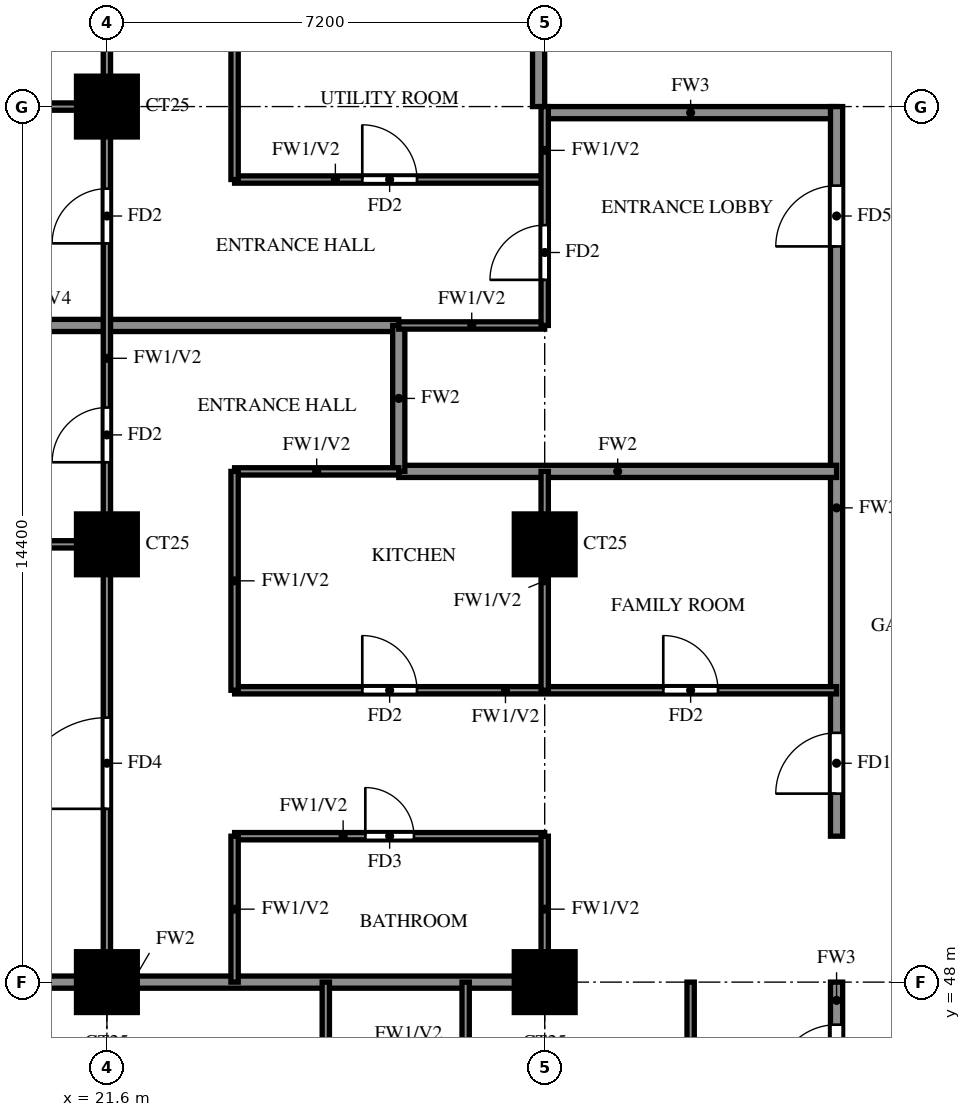
"""IFC4 building model, lengths in metres.
Left out: names, types, materials, properties, quantities, classifications, styles, units other than length and angle.
Written with IfcOpenShell. Run it as: python <this file> out.ifc"""

import sys

from ifc_helpers import new_model, si_unit, direction, frame, frame_2d, origin, origin_2d, place, context, subcontext, project, spatial, rectangle, extrude, source, transform, mapped, element, fill, save


model = new_model("IFC4")
c1 = context("Model", 3, precision=1e-05, world=origin(), true_north=direction((0.0, 1.0)))
c2 = subcontext(c1, "Body", "Model", "MODEL_VIEW")
j1 = project(units=[si_unit("LENGTHUNIT", "METRE"), si_unit("PLANEANGLEUNIT", "RADIAN")], contexts=[c1])
p1 = place(None, origin())
s1 = spatial("IfcSite", under=j1, at=p1, CompositionType="ELEMENT")
p2 = place(p1, origin())
s2 = spatial("IfcBuilding", under=s1, at=p2, CompositionType="ELEMENT")
p3 = place(p2, frame((0.0, 0.0, 157.0)))
s3 = spatial("IfcBuildingStorey", under=s2, at=p3, CompositionType="ELEMENT", Elevation=157.0)
m1 = source(origin(), c2, "Body", "SweptSolid", [
    extrude(rectangle(XDim=1.0, YDim=1.0, at=origin_2d()), origin(), (0.0, 0.0, 1.0), 3.2),
])
for number, where, z_axis, x_axis in (
    (1, (21.6, 48.0, 0.0), (0.0, 0.0, 1.0), (1.0, 0.0, 0.0)),
    (2, (28.8, 48.0, 0.0), (0.0, 0.0, 1.0), (1.0, 0.0, 0.0)),
    (3, (21.6, 55.2, 0.0), (0.0, 0.0, 1.0), (1.0, 0.0, 0.0)),
    (4, (28.8, 55.2, 0.0), (0.0, 0.0, 1.0), (1.0, 0.0, 0.0)),
    (5, (21.6, 62.4, 0.0), (0.0, 0.0, 1.0), (1.0, 0.0, 0.0)),
):
    element("IfcColumn", number, at=place(p3, frame(where, z_axis=z_axis, x_axis=x_axis)), inside=s3, PredefinedType="COLUMN", context=c2, shape_type="MappedRepresentation", body=[
        mapped(m1, transform((0.0, 0.0, 0.0))),
    ])
p4 = place(p3, frame((28.8, 62.3, 0.0), z_axis=(0.0, 0.0, 1.0), x_axis=(1.0, 0.0, 0.0)))
e6 = element("IfcWall", 6, at=p4, inside=s3, PredefinedType="SOLIDWALL", context=c2, shape_type="SweptSolid", body=[
    extrude(rectangle(XDim=4.8, YDim=0.2, at=frame_2d((2.4, 0.0))), origin(), (0.0, 0.0, 1.0), 3.2),
])
p5 = place(p3, frame((28.7, 62.4, 0.0), z_axis=(0.0, 0.0, 1.0), x_axis=(0.0, 1.0, 0.0)))
e7 = element("IfcWall", 7, at=p5, inside=s3, PredefinedType="SOLIDWALL", context=c2, shape_type="SweptSolid", body=[
    extrude(rectangle(XDim=15.6, YDim=0.2, at=frame_2d((7.8, 0.0))), origin(), (0.0, 0.0, 1.0), 3.2),
])
p6 = place(p3, frame((33.6, 45.6, 0.0), z_axis=(0.0, 0.0, 1.0), x_axis=(0.0, 1.0, 0.0)))
e8 = element("IfcWall", 8, at=p6, inside=s3, PredefinedType="SOLIDWALL", context=c2, shape_type="SweptSolid", body=[
    extrude(rectangle(XDim=2.4, YDim=0.2, at=frame_2d((1.2, 0.0))), origin(), (0.0, 0.0, 1.0), 3.2),
])
p7 = place(p6, frame((0.7, 0.0, 0.0)))
e9 = element("IfcOpeningElement", 9, at=p7, cuts=e8, PredefinedType="OPENING", context=c2, shape_type="SweptSolid", body=[
    extrude(rectangle(XDim=1.0, YDim=2.1, at=frame_2d((0.5, 1.05))), frame((0.0, 0.11, 0.0), z_axis=(0.0, -1.0, 0.0), x_axis=(1.0, 0.0, 0.0)), (0.0, 0.0, 1.0), 0.22),
])
p8 = place(p3, frame((33.6, 50.4, 0.0), z_axis=(0.0, 0.0, 1.0), x_axis=(0.0, 1.0, 0.0)))
e10 = element("IfcWall", 10, at=p8, inside=s3, PredefinedType="SOLIDWALL", context=c2, shape_type="SweptSolid", body=[
    extrude(rectangle(XDim=12.0, YDim=0.2, at=frame_2d((6.0, 0.0))), origin(), (0.0, 0.0, 1.0), 3.2),
])
p9 = place(p8, frame((0.7, 0.0, 0.0)))
e11 = element("IfcOpeningElement", 11, at=p9, cuts=e10, PredefinedType="OPENING", context=c2, shape_type="SweptSolid", body=[
    extrude(rectangle(XDim=1.0, YDim=2.1, at=frame_2d((0.5, 1.05))), frame((0.0, 0.11, 0.0), z_axis=(0.0, -1.0, 0.0), x_axis=(1.0, 0.0, 0.0)), (0.0, 0.0, 1.0), 0.22),
])
p10 = place(p8, frame((9.7, 0.0, 0.0)))
e12 = element("IfcOpeningElement", 12, at=p10, cuts=e10, PredefinedType="OPENING", context=c2, shape_type="SweptSolid", body=[
    extrude(rectangle(XDim=1.0, YDim=2.1, at=frame_2d((0.5, 1.05))), frame((0.0, 0.11, 0.0), z_axis=(0.0, -1.0, 0.0), x_axis=(1.0, 0.0, 0.0)), (0.0, 0.0, 1.0), 0.22),
])
p11 = place(p3, frame((14.525, 48.0, 0.0), z_axis=(0.0, 0.0, 1.0), x_axis=(1.0, 0.0, 0.0)))
e13 = element("IfcWall", 13, at=p11, inside=s3, PredefinedType="SOLIDWALL", context=c2, shape_type="SweptSolid", body=[
    extrude(rectangle(XDim=14.275, YDim=0.2, at=frame_2d((7.138, 0.0))), origin(), (0.0, 0.0, 1.0), 3.2),
])
p12 = place(p3, frame((26.4, 56.4, 0.0), z_axis=(0.0, 0.0, 1.0), x_axis=(1.0, 0.0, 0.0)))
e14 = element("IfcWall", 14, at=p12, inside=s3, PredefinedType="SOLIDWALL", context=c2, shape_type="SweptSolid", body=[
    extrude(rectangle(XDim=7.2, YDim=0.2, at=frame_2d((3.6, 0.0))), origin(), (0.0, 0.0, 1.0), 3.2),
])
p13 = place(p3, frame((14.525, 58.8, 0.0), z_axis=(0.0, 0.0, 1.0), x_axis=(1.0, 0.0, 0.0)))
e15 = element("IfcWall", 15, at=p13, inside=s3, PredefinedType="SOLIDWALL", context=c2, shape_type="SweptSolid", body=[
    extrude(rectangle(XDim=11.875, YDim=0.2, at=frame_2d((5.938, 0.0))), origin(), (0.0, 0.0, 1.0), 2.3),
])
p14 = place(p3, frame((26.4, 56.4, 0.0), z_axis=(0.0, 0.0, 1.0), x_axis=(0.0, 1.0, 0.0)))
e16 = element("IfcWall", 16, at=p14, inside=s3, PredefinedType="SOLIDWALL", context=c2, shape_type="SweptSolid", body=[
    extrude(rectangle(XDim=2.4, YDim=0.2, at=frame_2d((1.2, 0.0))), origin(), (0.0, 0.0, 1.0), 3.2),
])
p15 = place(p3, frame((23.7, 50.4, 0.0), z_axis=(0.0, 0.0, 1.0), x_axis=(1.0, 0.0, 0.0)))
e17 = element("IfcWall", 17, at=p15, inside=s3, PredefinedType="PARTITIONING", context=c2, shape_type="SweptSolid", body=[
    extrude(rectangle(XDim=5.1, YDim=0.12, at=frame_2d((2.55, 0.0))), origin(), (0.0, 0.0, 1.0), 3.2),
])
p16 = place(p15, frame((2.15, 0.0, 0.0)))
e18 = element("IfcOpeningElement", 18, at=p16, cuts=e17, PredefinedType="OPENING", context=c2, shape_type="SweptSolid", body=[
    extrude(rectangle(XDim=0.8, YDim=2.1, at=frame_2d((0.4, 1.05))), frame((0.0, 0.07, 0.0), z_axis=(0.0, -1.0, 0.0), x_axis=(1.0, 0.0, 0.0)), (0.0, 0.0, 1.0), 0.14),
])
p17 = place(p3, frame((23.7, 52.8, 0.0), z_axis=(0.0, 0.0, 1.0), x_axis=(1.0, 0.0, 0.0)))
e19 = element("IfcWall", 19, at=p17, inside=s3, PredefinedType="PARTITIONING", context=c2, shape_type="SweptSolid", body=[
    extrude(rectangle(XDim=9.9, YDim=0.12, at=frame_2d((4.95, 0.0))), origin(), (0.0, 0.0, 1.0), 3.2),
])
p18 = place(p17, frame((2.1, 0.0, 0.0)))
e20 = element("IfcOpeningElement", 20, at=p18, cuts=e19, PredefinedType="OPENING", context=c2, shape_type="SweptSolid", body=[
    extrude(rectangle(XDim=0.9, YDim=2.1, at=frame_2d((0.45, 1.05))), frame((0.0, 0.07, 0.0), z_axis=(0.0, -1.0, 0.0), x_axis=(1.0, 0.0, 0.0)), (0.0, 0.0, 1.0), 0.14),
])
p19 = place(p17, frame((7.05, 0.0, 0.0)))
e21 = element("IfcOpeningElement", 21, at=p19, cuts=e19, PredefinedType="OPENING", context=c2, shape_type="SweptSolid", body=[
    extrude(rectangle(XDim=0.9, YDim=2.1, at=frame_2d((0.45, 1.05))), frame((0.0, 0.07, 0.0), z_axis=(0.0, -1.0, 0.0), x_axis=(1.0, 0.0, 0.0)), (0.0, 0.0, 1.0), 0.14),
])
p20 = place(p3, frame((14.525, 55.2, 0.0), z_axis=(0.0, 0.0, 1.0), x_axis=(1.0, 0.0, 0.0)))
e22 = element("IfcWall", 22, at=p20, inside=s3, PredefinedType="PARTITIONING", context=c2, shape_type="SweptSolid", body=[
    extrude(rectangle(XDim=7.075, YDim=0.12, at=frame_2d((3.538, 0.0))), origin(), (0.0, 0.0, 1.0), 3.2),
])
p21 = place(p3, frame((23.7, 56.4, 0.0), z_axis=(0.0, 0.0, 1.0), x_axis=(1.0, 0.0, 0.0)))
e23 = element("IfcWall", 23, at=p21, inside=s3, PredefinedType="PARTITIONING", context=c2, shape_type="SweptSolid", body=[
    extrude(rectangle(XDim=2.7, YDim=0.12, at=frame_2d((1.35, 0.0))), origin(), (0.0, 0.0, 1.0), 3.2),
])
p22 = place(p3, frame((26.4, 58.8, 0.0), z_axis=(0.0, 0.0, 1.0), x_axis=(1.0, 0.0, 0.0)))
e24 = element("IfcWall", 24, at=p22, inside=s3, PredefinedType="PARTITIONING", context=c2, shape_type="SweptSolid", body=[
    extrude(rectangle(XDim=2.4, YDim=0.12, at=frame_2d((1.2, 0.0))), origin(), (0.0, 0.0, 1.0), 3.2),
])
p23 = place(p3, frame((23.7, 61.2, 0.0), z_axis=(0.0, 0.0, 1.0), x_axis=(1.0, 0.0, 0.0)))
e25 = element("IfcWall", 25, at=p23, inside=s3, PredefinedType="PARTITIONING", context=c2, shape_type="SweptSolid", body=[
    extrude(rectangle(XDim=5.1, YDim=0.12, at=frame_2d((2.55, 0.0))), origin(), (0.0, 0.0, 1.0), 3.2),
])
p24 = place(p23, frame((2.1, 0.0, 0.0)))
e26 = element("IfcOpeningElement", 26, at=p24, cuts=e25, PredefinedType="OPENING", context=c2, shape_type="SweptSolid", body=[
    extrude(rectangle(XDim=0.9, YDim=2.1, at=frame_2d((0.45, 1.05))), frame((0.0, 0.07, 0.0), z_axis=(0.0, -1.0, 0.0), x_axis=(1.0, 0.0, 0.0)), (0.0, 0.0, 1.0), 0.14),
])
p25 = place(p3, frame((14.525, 62.4, 0.0), z_axis=(0.0, 0.0, 1.0), x_axis=(1.0, 0.0, 0.0)))
e27 = element("IfcWall", 27, at=p25, inside=s3, PredefinedType="PARTITIONING", context=c2, shape_type="SweptSolid", body=[
    extrude(rectangle(XDim=7.075, YDim=0.12, at=frame_2d((3.538, 0.0))), origin(), (0.0, 0.0, 1.0), 3.2),
])
p26 = place(p3, frame((21.6, 48.0, 0.0), z_axis=(0.0, 0.0, 1.0), x_axis=(0.0, 1.0, 0.0)))
e28 = element("IfcWall", 28, at=p26, inside=s3, PredefinedType="PARTITIONING", context=c2, shape_type="SweptSolid", body=[
    extrude(rectangle(XDim=21.6, YDim=0.12, at=frame_2d((10.8, 0.0))), origin(), (0.0, 0.0, 1.0), 3.2),
])
p27 = place(p26, frame((2.85, 0.0, 0.0)))
e29 = element("IfcOpeningElement", 29, at=p27, cuts=e28, PredefinedType="OPENING", context=c2, shape_type="SweptSolid", body=[
    extrude(rectangle(XDim=1.5, YDim=2.1, at=frame_2d((0.75, 1.05))), frame((0.0, 0.07, 0.0), z_axis=(0.0, -1.0, 0.0), x_axis=(1.0, 0.0, 0.0)), (0.0, 0.0, 1.0), 0.14),
])
p28 = place(p26, frame((8.55, 0.0, 0.0)))
e30 = element("IfcOpeningElement", 30, at=p28, cuts=e28, PredefinedType="OPENING", context=c2, shape_type="SweptSolid", body=[
    extrude(rectangle(XDim=0.9, YDim=2.1, at=frame_2d((0.45, 1.05))), frame((0.0, 0.07, 0.0), z_axis=(0.0, -1.0, 0.0), x_axis=(1.0, 0.0, 0.0)), (0.0, 0.0, 1.0), 0.14),
])
p29 = place(p26, frame((12.15, 0.0, 0.0)))
e31 = element("IfcOpeningElement", 31, at=p29, cuts=e28, PredefinedType="OPENING", context=c2, shape_type="SweptSolid", body=[
    extrude(rectangle(XDim=0.9, YDim=2.1, at=frame_2d((0.45, 1.05))), frame((0.0, 0.07, 0.0), z_axis=(0.0, -1.0, 0.0), x_axis=(1.0, 0.0, 0.0)), (0.0, 0.0, 1.0), 0.14),
])
p30 = place(p26, frame((17.55, 0.0, 0.0)))
e32 = element("IfcOpeningElement", 32, at=p30, cuts=e28, PredefinedType="OPENING", context=c2, shape_type="SweptSolid", body=[
    extrude(rectangle(XDim=0.9, YDim=2.1, at=frame_2d((0.45, 1.05))), frame((0.0, 0.07, 0.0), z_axis=(0.0, -1.0, 0.0), x_axis=(1.0, 0.0, 0.0)), (0.0, 0.0, 1.0), 0.14),
])
p31 = place(p3, frame((23.7, 48.0, 0.0), z_axis=(0.0, 0.0, 1.0), x_axis=(0.0, 1.0, 0.0)))
e33 = element("IfcWall", 33, at=p31, inside=s3, PredefinedType="PARTITIONING", context=c2, shape_type="SweptSolid", body=[
    extrude(rectangle(XDim=2.4, YDim=0.12, at=frame_2d((1.2, 0.0))), origin(), (0.0, 0.0, 1.0), 3.2),
])
p32 = place(p3, frame((23.7, 52.8, 0.0), z_axis=(0.0, 0.0, 1.0), x_axis=(0.0, 1.0, 0.0)))
e34 = element("IfcWall", 34, at=p32, inside=s3, PredefinedType="PARTITIONING", context=c2, shape_type="SweptSolid", body=[
    extrude(rectangle(XDim=3.6, YDim=0.12, at=frame_2d((1.8, 0.0))), origin(), (0.0, 0.0, 1.0), 3.2),
])
p33 = place(p3, frame((23.7, 61.2, 0.0), z_axis=(0.0, 0.0, 1.0), x_axis=(0.0, 1.0, 0.0)))
e35 = element("IfcWall", 35, at=p33, inside=s3, PredefinedType="PARTITIONING", context=c2, shape_type="SweptSolid", body=[
    extrude(rectangle(XDim=12.0, YDim=0.12, at=frame_2d((6.0, 0.0))), origin(), (0.0, 0.0, 1.0), 3.2),
])
p34 = place(p33, frame((4.2, 0.0, 0.0)))
e36 = element("IfcOpeningElement", 36, at=p34, cuts=e35, PredefinedType="OPENING", context=c2, shape_type="SweptSolid", body=[
    extrude(rectangle(XDim=0.9, YDim=2.1, at=frame_2d((0.45, 1.05))), frame((0.0, 0.07, 0.0), z_axis=(0.0, -1.0, 0.0), x_axis=(1.0, 0.0, 0.0)), (0.0, 0.0, 1.0), 0.14),
])
p35 = place(p33, frame((7.975, 0.0, 0.0)))
e37 = element("IfcOpeningElement", 37, at=p35, cuts=e35, PredefinedType="OPENING", context=c2, shape_type="SweptSolid", body=[
    extrude(rectangle(XDim=0.8, YDim=2.1, at=frame_2d((0.4, 1.05))), frame((0.0, 0.07, 0.0), z_axis=(0.0, -1.0, 0.0), x_axis=(1.0, 0.0, 0.0)), (0.0, 0.0, 1.0), 0.14),
])
p36 = place(p33, frame((10.45, 0.0, 0.0)))
e38 = element("IfcOpeningElement", 38, at=p36, cuts=e35, PredefinedType="OPENING", context=c2, shape_type="SweptSolid", body=[
    extrude(rectangle(XDim=0.8, YDim=2.1, at=frame_2d((0.4, 1.05))), frame((0.0, 0.07, 0.0), z_axis=(0.0, -1.0, 0.0), x_axis=(1.0, 0.0, 0.0)), (0.0, 0.0, 1.0), 0.14),
])
p37 = place(p3, frame((25.2, 39.725, 0.0), z_axis=(0.0, 0.0, 1.0), x_axis=(0.0, 1.0, 0.0)))
e39 = element("IfcWall", 39, at=p37, inside=s3, PredefinedType="PARTITIONING", context=c2, shape_type="SweptSolid", body=[
    extrude(rectangle(XDim=8.275, YDim=0.12, at=frame_2d((4.137, 0.0))), origin(), (0.0, 0.0, 1.0), 3.2),
])
p38 = place(p37, frame((4.525, 0.0, 0.0)))
e40 = element("IfcOpeningElement", 40, at=p38, cuts=e39, PredefinedType="OPENING", context=c2, shape_type="SweptSolid", body=[
    extrude(rectangle(XDim=0.9, YDim=2.1, at=frame_2d((0.45, 1.05))), frame((0.0, 0.07, 0.0), z_axis=(0.0, -1.0, 0.0), x_axis=(1.0, 0.0, 0.0)), (0.0, 0.0, 1.0), 0.14),
])
for number, where, z_axis, x_axis in (
    (41, (27.5, 45.6, 0.0), (0.0, 0.0, 1.0), (0.0, 1.0, 0.0)),
    (42, (28.8, 48.0, 0.0), (0.0, 0.0, 1.0), (0.0, 1.0, 0.0)),
):
    element("IfcWall", number, at=place(p3, frame(where, z_axis=z_axis, x_axis=x_axis)), inside=s3, PredefinedType="PARTITIONING", context=c2, shape_type="SweptSolid", body=[
        extrude(rectangle(XDim=2.4, YDim=0.12, at=frame_2d((1.2, 0.0))), origin(), (0.0, 0.0, 1.0), 3.2),
    ])
p39 = place(p3, frame((28.8, 52.8, 0.0), z_axis=(0.0, 0.0, 1.0), x_axis=(0.0, 1.0, 0.0)))
e43 = element("IfcWall", 43, at=p39, inside=s3, PredefinedType="PARTITIONING", context=c2, shape_type="SweptSolid", body=[
    extrude(rectangle(XDim=3.6, YDim=0.12, at=frame_2d((1.8, 0.0))), origin(), (0.0, 0.0, 1.0), 3.2),
])
p40 = place(p3, frame((28.8, 58.8, 0.0), z_axis=(0.0, 0.0, 1.0), x_axis=(0.0, 1.0, 0.0)))
e44 = element("IfcWall", 44, at=p40, inside=s3, PredefinedType="PARTITIONING", context=c2, shape_type="SweptSolid", body=[
    extrude(rectangle(XDim=3.6, YDim=0.12, at=frame_2d((1.8, 0.0))), origin(), (0.0, 0.0, 1.0), 3.2),
])
p41 = place(p40, frame((0.75, 0.0, 0.0)))
e45 = element("IfcOpeningElement", 45, at=p41, cuts=e44, PredefinedType="OPENING", context=c2, shape_type="SweptSolid", body=[
    extrude(rectangle(XDim=0.9, YDim=2.1, at=frame_2d((0.45, 1.05))), frame((0.0, 0.07, 0.0), z_axis=(0.0, -1.0, 0.0), x_axis=(1.0, 0.0, 0.0)), (0.0, 0.0, 1.0), 0.14),
])
p42 = place(p3, frame((31.2, 45.6, 0.0), z_axis=(0.0, 0.0, 1.0), x_axis=(0.0, 1.0, 0.0)))
e46 = element("IfcWall", 46, at=p42, inside=s3, PredefinedType="PARTITIONING", context=c2, shape_type="SweptSolid", body=[
    extrude(rectangle(XDim=2.4, YDim=0.12, at=frame_2d((1.2, 0.0))), origin(), (0.0, 0.0, 1.0), 3.2),
])
p43 = place(p7, origin())
e47 = element("IfcDoor", 47, at=p43, inside=s3, OperationType="SINGLE_SWING_LEFT", PredefinedType="DOOR", context=c2, shape_type="SweptSolid", body=[
    extrude(rectangle(XDim=1.0, YDim=2.1, at=frame_2d((0.5, 1.05))), frame((0.0, 0.025, 0.0), z_axis=(0.0, -1.0, 0.0), x_axis=(1.0, 0.0, 0.0)), (0.0, 0.0, 1.0), 0.05),
])
fill(e9, e47)
p44 = place(p9, origin())
e48 = element("IfcDoor", 48, at=p44, inside=s3, OperationType="SINGLE_SWING_RIGHT", PredefinedType="DOOR", context=c2, shape_type="SweptSolid", body=[
    extrude(rectangle(XDim=1.0, YDim=2.1, at=frame_2d((0.5, 1.05))), frame((0.0, 0.025, 0.0), z_axis=(0.0, -1.0, 0.0), x_axis=(1.0, 0.0, 0.0)), (0.0, 0.0, 1.0), 0.05),
])
fill(e11, e48)
p45 = place(p27, origin())
e49 = element("IfcDoor", 49, at=p45, inside=s3, OperationType="SINGLE_SWING_LEFT", PredefinedType="DOOR", context=c2, shape_type="SweptSolid", body=[
    extrude(rectangle(XDim=1.5, YDim=2.1, at=frame_2d((0.75, 1.05))), frame((0.0, 0.025, 0.0), z_axis=(0.0, -1.0, 0.0), x_axis=(1.0, 0.0, 0.0)), (0.0, 0.0, 1.0), 0.05),
])
fill(e29, e49)
p46 = place(p28, origin())
e50 = element("IfcDoor", 50, at=p46, inside=s3, OperationType="SINGLE_SWING_LEFT", PredefinedType="DOOR", context=c2, shape_type="SweptSolid", body=[
    extrude(rectangle(XDim=0.9, YDim=2.1, at=frame_2d((0.45, 1.05))), frame((0.0, 0.025, 0.0), z_axis=(0.0, -1.0, 0.0), x_axis=(1.0, 0.0, 0.0)), (0.0, 0.0, 1.0), 0.05),
])
fill(e30, e50)
p47 = place(p16, origin())
e51 = element("IfcDoor", 51, at=p47, inside=s3, OperationType="SINGLE_SWING_RIGHT", PredefinedType="DOOR", context=c2, shape_type="SweptSolid", body=[
    extrude(rectangle(XDim=0.8, YDim=2.1, at=frame_2d((0.4, 1.05))), frame((0.0, 0.025, 0.0), z_axis=(0.0, -1.0, 0.0), x_axis=(1.0, 0.0, 0.0)), (0.0, 0.0, 1.0), 0.05),
])
fill(e18, e51)
p48 = place(p18, origin())
e52 = element("IfcDoor", 52, at=p48, inside=s3, OperationType="SINGLE_SWING_LEFT", PredefinedType="DOOR", context=c2, shape_type="SweptSolid", body=[
    extrude(rectangle(XDim=0.9, YDim=2.1, at=frame_2d((0.45, 1.05))), frame((0.0, 0.025, 0.0), z_axis=(0.0, -1.0, 0.0), x_axis=(1.0, 0.0, 0.0)), (0.0, 0.0, 1.0), 0.05),
])
fill(e20, e52)
p49 = place(p19, origin())
e53 = element("IfcDoor", 53, at=p49, inside=s3, OperationType="SINGLE_SWING_LEFT", PredefinedType="DOOR", context=c2, shape_type="SweptSolid", body=[
    extrude(rectangle(XDim=0.9, YDim=2.1, at=frame_2d((0.45, 1.05))), frame((0.0, 0.025, 0.0), z_axis=(0.0, -1.0, 0.0), x_axis=(1.0, 0.0, 0.0)), (0.0, 0.0, 1.0), 0.05),
])
fill(e21, e53)
p50 = place(p41, origin())
e54 = element("IfcDoor", 54, at=p50, inside=s3, OperationType="SINGLE_SWING_LEFT", PredefinedType="DOOR", context=c2, shape_type="SweptSolid", body=[
    extrude(rectangle(XDim=0.9, YDim=2.1, at=frame_2d((0.45, 1.05))), frame((0.0, 0.025, 0.0), z_axis=(0.0, -1.0, 0.0), x_axis=(1.0, 0.0, 0.0)), (0.0, 0.0, 1.0), 0.05),
])
fill(e45, e54)
p51 = place(p10, origin())
e55 = element("IfcDoor", 55, at=p51, inside=s3, OperationType="SINGLE_SWING_LEFT", PredefinedType="DOOR", context=c2, shape_type="SweptSolid", body=[
    extrude(rectangle(XDim=1.0, YDim=2.1, at=frame_2d((0.5, 1.05))), frame((0.0, 0.025, 0.0), z_axis=(0.0, -1.0, 0.0), x_axis=(1.0, 0.0, 0.0)), (0.0, 0.0, 1.0), 0.05),
])
fill(e12, e55)
p52 = place(p29, origin())
e56 = element("IfcDoor", 56, at=p52, inside=s3, OperationType="SINGLE_SWING_RIGHT", PredefinedType="DOOR", context=c2, shape_type="SweptSolid", body=[
    extrude(rectangle(XDim=0.9, YDim=2.1, at=frame_2d((0.45, 1.05))), frame((0.0, 0.025, 0.0), z_axis=(0.0, -1.0, 0.0), x_axis=(1.0, 0.0, 0.0)), (0.0, 0.0, 1.0), 0.05),
])
fill(e31, e56)
p53 = place(p24, origin())
e57 = element("IfcDoor", 57, at=p53, inside=s3, OperationType="SINGLE_SWING_LEFT", PredefinedType="DOOR", context=c2, shape_type="SweptSolid", body=[
    extrude(rectangle(XDim=0.9, YDim=2.1, at=frame_2d((0.45, 1.05))), frame((0.0, 0.025, 0.0), z_axis=(0.0, -1.0, 0.0), x_axis=(1.0, 0.0, 0.0)), (0.0, 0.0, 1.0), 0.05),
])
fill(e26, e57)
save(model, sys.argv[1])
